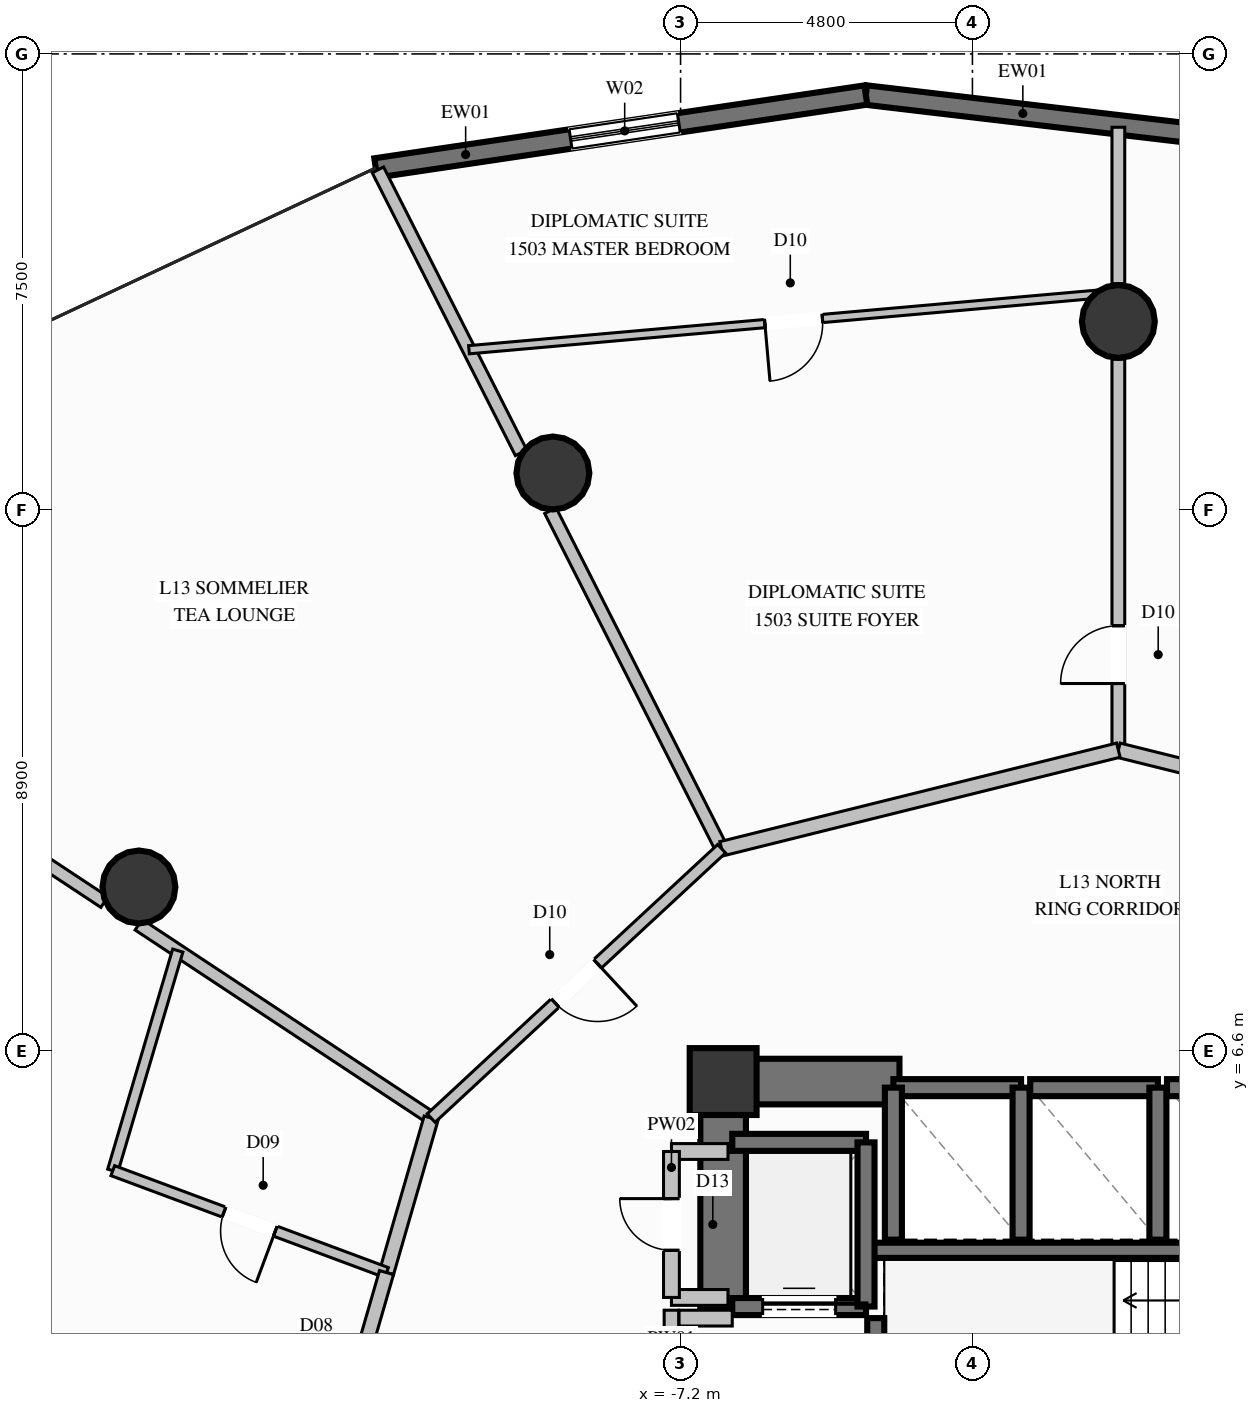
"""IFC4 building model, lengths in metres.
Left out: names, types, materials, properties, quantities, classifications, styles, units other than length and angle.
Written with IfcOpenShell. Run it as: python <this file> out.ifc"""

import sys

from ifc_helpers import new_model, si_unit, direction, frame, frame_2d, origin, origin_2d, place, context, subcontext, project, spatial, rectangle, circle, extrude, element, fill, save


model = new_model("IFC4")
c1 = context("Model", 3, precision=1e-05, world=origin(), true_north=direction((0.0, 1.0)))
c2 = subcontext(c1, "Body", "Model", "MODEL_VIEW")
j1 = project(units=[si_unit("LENGTHUNIT", "METRE"), si_unit("PLANEANGLEUNIT", "RADIAN")], contexts=[c1])
p1 = place(None, origin())
s1 = spatial("IfcSite", under=j1, at=p1, CompositionType="ELEMENT")
p2 = place(p1, origin())
s2 = spatial("IfcBuilding", under=s1, at=p2, CompositionType="ELEMENT")
p3 = place(p2, frame((0.0, 0.0, 57.2)))
s3 = spatial("IfcBuildingStorey", under=s2, at=p3, CompositionType="ELEMENT", Elevation=57.2)
p4 = place(p3, frame((-6.5, 6.1, 0.0), z_axis=(0.0, 0.0, 1.0), x_axis=(1.0, 0.0, 0.0)))
e1 = element("IfcColumn", 1, at=p4, inside=s3, PredefinedType="COLUMN", context=c2, shape_type="SweptSolid", body=[
    extrude(rectangle(XDim=1.1, YDim=1.1, at=origin_2d()), origin(), (0.0, 0.0, 1.0), 3.6),
])
p5 = place(p3, frame((-4.13, 3.325, 0.0), z_axis=(0.0, 0.0, 1.0), x_axis=(1.0, 0.0, 0.0)))
e2 = element("IfcWall", 2, at=p5, inside=s3, PredefinedType="SOLIDWALL", context=c2, shape_type="SweptSolid", body=[
    extrude(rectangle(XDim=8.26, YDim=0.25, at=frame_2d((4.13, 0.0))), origin(), (0.0, 0.0, 1.0), 3.6),
])
p6 = place(p3, frame((-6.125, 6.1, 0.0), z_axis=(0.0, 0.0, 1.0), x_axis=(1.0, 0.0, 0.0)))
e3 = element("IfcWall", 3, at=p6, inside=s3, PredefinedType="SHEAR", context=c2, shape_type="SweptSolid", body=[
    extrude(rectangle(XDim=2.525, YDim=0.75, at=frame_2d((1.262, 0.0))), origin(), (0.0, 0.0, 1.0), 3.6),
])
p7 = place(p3, frame((-6.5, 2.35, 0.0), z_axis=(0.0, 0.0, 1.0), x_axis=(0.0, 1.0, 0.0)))
e4 = element("IfcWall", 4, at=p7, inside=s3, PredefinedType="SHEAR", context=c2, shape_type="SweptSolid", body=[
    extrude(rectangle(XDim=4.125, YDim=0.75, at=frame_2d((2.062, 0.0))), origin(), (0.0, 0.0, 1.0), 3.6),
])
for number, where, z_axis, x_axis in (
    (5, (0.0, 18.6, 0.0), (0.0, 0.0, 1.0), (1.0, 0.0, 0.0)),
    (6, (-9.3, 16.108, 0.0), (0.0, 0.0, 1.0), (1.0, 0.0, 0.0)),
    (7, (-16.108, 9.3, 0.0), (0.0, 0.0, 1.0), (1.0, 0.0, 0.0)),
):
    element("IfcColumn", number, at=place(p3, frame(where, z_axis=z_axis, x_axis=x_axis)), inside=s3, PredefinedType="COLUMN", context=c2, shape_type="SweptSolid", body=[
        extrude(circle(Radius=0.6, at=origin_2d()), origin(), (0.0, 0.0, 1.0), 3.6),
    ])
p8 = place(p3, frame((-4.153, 22.324, 0.0), z_axis=(0.0, 0.0, 1.0), x_axis=(0.993124034761, -0.117066867986, 0.0)))
e8 = element("IfcWall", 8, at=p8, inside=s3, PredefinedType="SOLIDWALL", context=c2, shape_type="SweptSolid", body=[
    extrude(rectangle(XDim=8.413, YDim=0.32, at=frame_2d((4.207, 0.0))), origin(), (0.0, 0.0, 1.0), 3.34),
])
p9 = place(p8, frame((5.45, 0.0, 0.35)))
e9 = element("IfcOpeningElement", 9, at=p9, cuts=e8, PredefinedType="OPENING", context=c2, shape_type="SweptSolid", body=[
    extrude(rectangle(XDim=1.8, YDim=2.6, at=frame_2d((0.9, 1.3))), frame((0.0, 0.17, 0.0), z_axis=(0.0, -1.0, 0.0), x_axis=(1.0, 0.0, 0.0)), (0.0, 0.0, 1.0), 0.34),
])
p10 = place(p3, frame((-12.213, 21.125, 0.0), z_axis=(0.0, 0.0, 1.0), x_axis=(0.989115613059, 0.147140422734, 0.0)))
e10 = element("IfcWall", 10, at=p10, inside=s3, PredefinedType="SOLIDWALL", context=c2, shape_type="SweptSolid", body=[
    extrude(rectangle(XDim=8.148, YDim=0.32, at=frame_2d((4.074, 0.0))), origin(), (0.0, 0.0, 1.0), 3.34),
])
p11 = place(p10, frame((3.239, 0.0, 0.35)))
e11 = element("IfcOpeningElement", 11, at=p11, cuts=e10, PredefinedType="OPENING", context=c2, shape_type="SweptSolid", body=[
    extrude(rectangle(XDim=1.8, YDim=2.6, at=frame_2d((0.9, 1.3))), frame((0.0, 0.17, 0.0), z_axis=(0.0, -1.0, 0.0), x_axis=(1.0, 0.0, 0.0)), (0.0, 0.0, 1.0), 0.34),
])
p12 = place(p3, frame((-1.6, 6.0, 0.0), z_axis=(0.0, 0.0, 1.0), x_axis=(-1.0, 0.0, 0.0)))
e12 = element("IfcWall", 12, at=p12, inside=s3, PredefinedType="SOLIDWALL", context=c2, shape_type="SweptSolid", body=[
    extrude(rectangle(XDim=2.1, YDim=0.28, at=frame_2d((1.05, 0.0))), origin(), (0.0, 0.0, 1.0), 3.34),
])
for number, where, z_axis, x_axis in (
    (13, (-3.7, 6.0, 0.0), (0.0, 0.0, 1.0), (0.0, -1.0, 0.0)),
    (14, (-1.6, 3.5, 0.0), (0.0, 0.0, 1.0), (0.0, 1.0, 0.0)),
):
    element("IfcWall", number, at=place(p3, frame(where, z_axis=z_axis, x_axis=x_axis)), inside=s3, PredefinedType="SOLIDWALL", context=c2, shape_type="SweptSolid", body=[
        extrude(rectangle(XDim=2.5, YDim=0.28, at=frame_2d((1.25, 0.0))), origin(), (0.0, 0.0, 1.0), 3.34),
    ])
p13 = place(p3, frame((0.65, 6.0, 0.0), z_axis=(0.0, 0.0, 1.0), x_axis=(-1.0, 0.0, 0.0)))
e15 = element("IfcWall", 15, at=p13, inside=s3, PredefinedType="SOLIDWALL", context=c2, shape_type="SweptSolid", body=[
    extrude(rectangle(XDim=2.1, YDim=0.28, at=frame_2d((1.05, 0.0))), origin(), (0.0, 0.0, 1.0), 3.34),
])
p14 = place(p3, frame((0.65, 3.5, 0.0), z_axis=(0.0, 0.0, 1.0), x_axis=(0.0, 1.0, 0.0)))
e16 = element("IfcWall", 16, at=p14, inside=s3, PredefinedType="SOLIDWALL", context=c2, shape_type="SweptSolid", body=[
    extrude(rectangle(XDim=2.5, YDim=0.28, at=frame_2d((1.25, 0.0))), origin(), (0.0, 0.0, 1.0), 3.34),
])
p15 = place(p3, frame((3.0, 6.0, 0.0), z_axis=(0.0, 0.0, 1.0), x_axis=(-1.0, 0.0, 0.0)))
e17 = element("IfcWall", 17, at=p15, inside=s3, PredefinedType="SOLIDWALL", context=c2, shape_type="SweptSolid", body=[
    extrude(rectangle(XDim=2.2, YDim=0.28, at=frame_2d((1.1, 0.0))), origin(), (0.0, 0.0, 1.0), 3.34),
])
p16 = place(p3, frame((-6.35, 2.4, 0.0), z_axis=(0.0, 0.0, 1.0), x_axis=(1.0, 0.0, 0.0)))
e18 = element("IfcWall", 18, at=p16, inside=s3, PredefinedType="SOLIDWALL", context=c2, shape_type="SweptSolid", body=[
    extrude(rectangle(XDim=2.2, YDim=0.28, at=frame_2d((1.1, 0.0))), origin(), (0.0, 0.0, 1.0), 3.34),
])
p17 = place(p16, frame((0.5, 0.0, 0.0)))
e19 = element("IfcOpeningElement", 19, at=p17, cuts=e18, PredefinedType="OPENING", context=c2, shape_type="SweptSolid", body=[
    extrude(rectangle(XDim=1.2, YDim=2.2, at=frame_2d((0.6, 1.1))), frame((0.0, 0.15, 0.0), z_axis=(0.0, -1.0, 0.0), x_axis=(1.0, 0.0, 0.0)), (0.0, 0.0, 1.0), 0.3),
])
p18 = place(p3, frame((-4.15, 5.1, 0.0), z_axis=(0.0, 0.0, 1.0), x_axis=(-1.0, 0.0, 0.0)))
e20 = element("IfcWall", 20, at=p18, inside=s3, PredefinedType="SOLIDWALL", context=c2, shape_type="SweptSolid", body=[
    extrude(rectangle(XDim=2.2, YDim=0.28, at=frame_2d((1.1, 0.0))), origin(), (0.0, 0.0, 1.0), 3.34),
])
p19 = place(p3, frame((-4.15, 2.4, 0.0), z_axis=(0.0, 0.0, 1.0), x_axis=(0.0, 1.0, 0.0)))
e21 = element("IfcWall", 21, at=p19, inside=s3, PredefinedType="SOLIDWALL", context=c2, shape_type="SweptSolid", body=[
    extrude(rectangle(XDim=2.7, YDim=0.28, at=frame_2d((1.35, 0.0))), origin(), (0.0, 0.0, 1.0), 3.34),
])
p20 = place(p3, frame((-3.99, -3.25, 0.0), z_axis=(0.0, 0.0, 1.0), x_axis=(0.0, 1.0, 0.0)))
e22 = element("IfcWall", 22, at=p20, inside=s3, PredefinedType="SOLIDWALL", context=c2, shape_type="SweptSolid", body=[
    extrude(rectangle(XDim=5.46, YDim=0.28, at=frame_2d((2.73, 0.0))), origin(), (0.0, 0.0, 1.0), 3.34),
])
p21 = place(p20, frame((0.937, 0.0, 0.0)))
e23 = element("IfcOpeningElement", 23, at=p21, cuts=e22, PredefinedType="OPENING", context=c2, shape_type="SweptSolid", body=[
    extrude(rectangle(XDim=1.2, YDim=2.2, at=frame_2d((0.6, 1.1))), frame((0.0, 0.15, 0.0), z_axis=(0.0, -1.0, 0.0), x_axis=(1.0, 0.0, 0.0)), (0.0, 0.0, 1.0), 0.3),
])
p22 = place(p3, frame((-7.35, -2.78, 0.0), z_axis=(0.0, 0.0, 1.0), x_axis=(0.0, 1.0, 0.0)))
e24 = element("IfcWall", 24, at=p22, inside=s3, PredefinedType="PARTITIONING", context=c2, shape_type="SweptSolid", body=[
    extrude(rectangle(XDim=5.12, YDim=0.24, at=frame_2d((2.56, 0.0))), origin(), (0.0, 0.0, 1.0), 2.425),
])
p23 = place(p22, frame((1.389, 0.0, 0.0)))
e25 = element("IfcOpeningElement", 25, at=p23, cuts=e24, PredefinedType="OPENING", context=c2, shape_type="SweptSolid", body=[
    extrude(rectangle(XDim=1.15, YDim=2.2, at=frame_2d((0.575, 1.1))), frame((0.0, 0.13, 0.0), z_axis=(0.0, -1.0, 0.0), x_axis=(1.0, 0.0, 0.0)), (0.0, 0.0, 1.0), 0.26),
])
p24 = place(p3, frame((-7.225, 2.21, 0.0), z_axis=(0.0, 0.0, 1.0), x_axis=(1.0, 0.0, 0.0)))
e26 = element("IfcWall", 26, at=p24, inside=s3, PredefinedType="PARTITIONING", context=c2, shape_type="SweptSolid", body=[
    extrude(rectangle(XDim=0.875, YDim=0.26, at=frame_2d((0.438, 0.0))), origin(), (0.0, 0.0, 1.0), 3.34),
])
for number, where, z_axis, x_axis in (
    (27, (-7.35, 4.95, 0.0), (0.0, 0.0, 1.0), (1.0, 0.0, 0.0)),
    (28, (-7.35, 2.55, 0.0), (0.0, 0.0, 1.0), (1.0, 0.0, 0.0)),
):
    element("IfcWall", number, at=place(p3, frame(where, z_axis=z_axis, x_axis=x_axis)), inside=s3, PredefinedType="PARTITIONING", context=c2, shape_type="SweptSolid", body=[
        extrude(rectangle(XDim=0.93, YDim=0.26, at=frame_2d((0.465, 0.0))), origin(), (0.0, 0.0, 1.0), 3.34),
    ])
p25 = place(p3, frame((-7.35, 2.55, 0.0), z_axis=(0.0, 0.0, 1.0), x_axis=(0.0, 1.0, 0.0)))
e29 = element("IfcWall", 29, at=p25, inside=s3, PredefinedType="PARTITIONING", context=c2, shape_type="SweptSolid", body=[
    extrude(rectangle(XDim=2.4, YDim=0.26, at=frame_2d((1.2, 0.0))), origin(), (0.0, 0.0, 1.0), 2.425),
])
p26 = place(p25, frame((0.775, 0.0, 0.0)))
e30 = element("IfcOpeningElement", 30, at=p26, cuts=e29, PredefinedType="OPENING", context=c2, shape_type="SweptSolid", body=[
    extrude(rectangle(XDim=0.85, YDim=2.05, at=frame_2d((0.425, 1.025))), frame((0.0, 0.14, 0.0), z_axis=(0.0, -1.0, 0.0), x_axis=(1.0, 0.0, 0.0)), (0.0, 0.0, 1.0), 0.28),
])
p27 = place(p3, frame((0.0, 11.55, 0.0), z_axis=(0.0, 0.0, 1.0), x_axis=(0.0, 1.0, 0.0)))
e31 = element("IfcWall", 31, at=p27, inside=s3, PredefinedType="PARTITIONING", context=c2, shape_type="SweptSolid", body=[
    extrude(rectangle(XDim=6.43, YDim=0.21, at=frame_2d((3.215, 0.0))), origin(), (0.0, 0.0, 1.0), 2.707),
])
p28 = place(p27, frame((1.096, 0.0, 0.0)))
e32 = element("IfcOpeningElement", 32, at=p28, cuts=e31, PredefinedType="OPENING", context=c2, shape_type="SweptSolid", body=[
    extrude(rectangle(XDim=0.95, YDim=2.1, at=frame_2d((0.475, 1.05))), frame((0.0, 0.115, 0.0), z_axis=(0.0, -1.0, 0.0), x_axis=(1.0, 0.0, 0.0)), (0.0, 0.0, 1.0), 0.23),
])
p29 = place(p3, frame((0.0, 19.22, 0.0), z_axis=(0.0, 0.0, 1.0), x_axis=(0.0, 1.0, 0.0)))
e33 = element("IfcWall", 33, at=p29, inside=s3, PredefinedType="PARTITIONING", context=c2, shape_type="SweptSolid", body=[
    extrude(rectangle(XDim=2.574, YDim=0.21, at=frame_2d((1.287, 0.0))), origin(), (0.0, 0.0, 1.0), 3.34),
])
p30 = place(p3, frame((-6.525, 9.929, 0.0), z_axis=(0.0, 0.0, 1.0), x_axis=(-0.451845511916, 0.892096201853, 0.0)))
e34 = element("IfcWall", 34, at=p30, inside=s3, PredefinedType="PARTITIONING", context=c2, shape_type="SweptSolid", body=[
    extrude(rectangle(XDim=6.233, YDim=0.21, at=frame_2d((3.116, 0.0))), origin(), (0.0, 0.0, 1.0), 2.707),
])
p31 = place(p3, frame((-9.823, 16.441, 0.0), z_axis=(0.0, 0.0, 1.0), x_axis=(-0.451646831952, 0.892196805188, 0.0)))
e35 = element("IfcWall", 35, at=p31, inside=s3, PredefinedType="PARTITIONING", context=c2, shape_type="SweptSolid", body=[
    extrude(rectangle(XDim=5.214, YDim=0.21, at=frame_2d((2.607, 0.0))), origin(), (0.0, 0.0, 1.0), 3.34),
])
p32 = place(p3, frame((-11.302, 5.5, 0.0), z_axis=(0.0, 0.0, 1.0), x_axis=(-0.834238648556, 0.551403552088, 0.0)))
e36 = element("IfcWall", 36, at=p32, inside=s3, PredefinedType="PARTITIONING", context=c2, shape_type="SweptSolid", body=[
    extrude(rectangle(XDim=5.767, YDim=0.21, at=frame_2d((2.884, 0.0))), origin(), (0.0, 0.0, 1.0), 2.707),
])
p33 = place(p3, frame((-16.676, 9.052, 0.0), z_axis=(0.0, 0.0, 1.0), x_axis=(-0.834224712382, 0.551424636057, 0.0)))
e37 = element("IfcWall", 37, at=p33, inside=s3, PredefinedType="PARTITIONING", context=c2, shape_type="SweptSolid", body=[
    extrude(rectangle(XDim=8.25, YDim=0.21, at=frame_2d((4.125, 0.0))), origin(), (0.0, 0.0, 1.0), 3.34),
])
p34 = place(p3, frame((-11.302, 5.5, 0.0), z_axis=(0.0, 0.0, 1.0), x_axis=(-0.277475281216, -0.960732776746, 0.0)))
e38 = element("IfcWall", 38, at=p34, inside=s3, PredefinedType="PARTITIONING", context=c2, shape_type="SweptSolid", body=[
    extrude(rectangle(XDim=2.645, YDim=0.24, at=frame_2d((1.322, 0.0))), origin(), (0.0, 0.0, 1.0), 3.34),
])
p35 = place(p3, frame((-15.469, 8.254, 0.0), z_axis=(0.0, 0.0, 1.0), x_axis=(-0.283315036378, -0.959026897518, 0.0)))
e39 = element("IfcWall", 39, at=p35, inside=s3, PredefinedType="PLUMBINGWALL", context=c2, shape_type="SweptSolid", body=[
    extrude(rectangle(XDim=3.773, YDim=0.175, at=frame_2d((1.887, 0.0))), origin(), (0.0, 0.0, 1.0), 3.34),
])
p36 = place(p3, frame((-12.036, 2.959, 0.0), z_axis=(0.0, 0.0, 1.0), x_axis=(-0.937168147188, 0.348878007182, 0.0)))
e40 = element("IfcWall", 40, at=p36, inside=s3, PredefinedType="PLUMBINGWALL", context=c2, shape_type="SweptSolid", body=[
    extrude(rectangle(XDim=4.804, YDim=0.175, at=frame_2d((2.402, 0.0))), origin(), (0.0, 0.0, 1.0), 3.34),
])
p37 = place(p36, frame((1.952, 0.0, 0.0)))
e41 = element("IfcOpeningElement", 41, at=p37, cuts=e40, PredefinedType="OPENING", context=c2, shape_type="SweptSolid", body=[
    extrude(rectangle(XDim=0.9, YDim=2.1, at=frame_2d((0.45, 1.05))), frame((0.0, 0.098, 0.0), z_axis=(0.0, -1.0, 0.0), x_axis=(1.0, 0.0, 0.0)), (0.0, 0.0, 1.0), 0.195),
])
p38 = place(p3, frame((-12.036, 2.959, 0.0), z_axis=(0.0, 0.0, 1.0), x_axis=(-0.277650694477, -0.960682097187, 0.0)))
e42 = element("IfcWall", 42, at=p38, inside=s3, PredefinedType="PARTITIONING", context=c2, shape_type="SweptSolid", body=[
    extrude(rectangle(XDim=3.653, YDim=0.24, at=frame_2d((1.826, 0.0))), origin(), (0.0, 0.0, 1.0), 3.34),
])
p39 = place(p38, frame((1.276, 0.0, 0.0)))
e43 = element("IfcOpeningElement", 43, at=p39, cuts=e42, PredefinedType="OPENING", context=c2, shape_type="SweptSolid", body=[
    extrude(rectangle(XDim=1.1, YDim=2.3, at=frame_2d((0.55, 1.15))), frame((0.0, 0.13, 0.0), z_axis=(0.0, -1.0, 0.0), x_axis=(1.0, 0.0, 0.0)), (0.0, 0.0, 1.0), 0.26),
])
for number, where, z_axis, x_axis in (
    (44, (6.525, 9.929, 0.0), (0.0, 0.0, 1.0), (-0.97, 0.241, 0.0)),
    (45, (0.0, 11.55, 0.0), (0.0, 0.0, 1.0), (-0.97, -0.241, 0.0)),
):
    element("IfcWall", number, at=place(p3, frame(where, z_axis=z_axis, x_axis=x_axis)), inside=s3, PredefinedType="PARTITIONING", context=c2, shape_type="SweptSolid", body=[
        extrude(rectangle(XDim=6.723, YDim=0.24, at=frame_2d((3.362, 0.0))), origin(), (0.0, 0.0, 1.0), 2.919),
    ])
p40 = place(p3, frame((0.0, 19.079, 0.0), z_axis=(0.0, 0.0, 1.0), x_axis=(-0.996115587984, -0.088055297262, 0.0)))
e46 = element("IfcWall", 46, at=p40, inside=s3, PredefinedType="PARTITIONING", context=c2, shape_type="SweptSolid", body=[
    extrude(rectangle(XDim=10.722, YDim=0.135, at=frame_2d((5.361, 0.0))), origin(), (0.0, 0.0, 1.0), 2.792),
])
p41 = place(p40, frame((4.886, 0.0, 0.0)))
e47 = element("IfcOpeningElement", 47, at=p41, cuts=e46, PredefinedType="OPENING", context=c2, shape_type="SweptSolid", body=[
    extrude(rectangle(XDim=0.95, YDim=2.1, at=frame_2d((0.475, 1.05))), frame((0.0, 0.078, 0.0), z_axis=(0.0, -1.0, 0.0), x_axis=(1.0, 0.0, 0.0)), (0.0, 0.0, 1.0), 0.155),
])
p42 = place(p3, frame((-6.525, 9.929, 0.0), z_axis=(0.0, 0.0, 1.0), x_axis=(-0.733323191675, -0.679880207501, 0.0)))
e48 = element("IfcWall", 48, at=p42, inside=s3, PredefinedType="PARTITIONING", context=c2, shape_type="SweptSolid", body=[
    extrude(rectangle(XDim=6.514, YDim=0.19, at=frame_2d((3.257, 0.0))), origin(), (0.0, 0.0, 1.0), 3.34),
])
p43 = place(p42, frame((2.782, 0.0, 0.0)))
e49 = element("IfcOpeningElement", 49, at=p43, cuts=e48, PredefinedType="OPENING", context=c2, shape_type="SweptSolid", body=[
    extrude(rectangle(XDim=0.95, YDim=2.1, at=frame_2d((0.475, 1.05))), frame((0.0, 0.105, 0.0), z_axis=(0.0, -1.0, 0.0), x_axis=(1.0, 0.0, 0.0)), (0.0, 0.0, 1.0), 0.21),
])
p44 = place(p11, origin())
e50 = element("IfcWindow", 50, at=p44, inside=s3, PartitioningType="SINGLE_PANEL", PredefinedType="WINDOW", context=c2, shape_type="SweptSolid", body=[
    extrude(rectangle(XDim=1.8, YDim=2.6, at=frame_2d((0.9, 1.3))), frame((0.0, 0.03, 0.0), z_axis=(0.0, -1.0, 0.0), x_axis=(1.0, 0.0, 0.0)), (0.0, 0.0, 1.0), 0.06),
])
fill(e11, e50)
p45 = place(p17, origin())
e51 = element("IfcDoor", 51, at=p45, inside=s3, OperationType="SLIDING_TO_LEFT", PredefinedType="DOOR", context=c2, shape_type="SweptSolid", body=[
    extrude(rectangle(XDim=1.2, YDim=2.2, at=frame_2d((0.6, 1.1))), frame((0.0, 0.025, 0.0), z_axis=(0.0, -1.0, 0.0), x_axis=(1.0, 0.0, 0.0)), (0.0, 0.0, 1.0), 0.05),
])
fill(e19, e51)
p46 = place(p26, origin())
e52 = element("IfcDoor", 52, at=p46, inside=s3, OperationType="SINGLE_SWING_RIGHT", PredefinedType="DOOR", context=c2, shape_type="SweptSolid", body=[
    extrude(rectangle(XDim=0.85, YDim=2.05, at=frame_2d((0.425, 1.025))), frame((0.0, 0.025, 0.0), z_axis=(0.0, -1.0, 0.0), x_axis=(1.0, 0.0, 0.0)), (0.0, 0.0, 1.0), 0.05),
])
fill(e30, e52)
p47 = place(p37, origin())
e53 = element("IfcDoor", 53, at=p47, inside=s3, OperationType="SINGLE_SWING_LEFT", PredefinedType="DOOR", context=c2, shape_type="SweptSolid", body=[
    extrude(rectangle(XDim=0.9, YDim=2.1, at=frame_2d((0.45, 1.05))), frame((0.0, 0.025, 0.0), z_axis=(0.0, -1.0, 0.0), x_axis=(1.0, 0.0, 0.0)), (0.0, 0.0, 1.0), 0.05),
])
fill(e41, e53)
p48 = place(p28, origin())
e54 = element("IfcDoor", 54, at=p48, inside=s3, OperationType="SINGLE_SWING_LEFT", PredefinedType="DOOR", context=c2, shape_type="SweptSolid", body=[
    extrude(rectangle(XDim=0.95, YDim=2.1, at=frame_2d((0.475, 1.05))), frame((0.0, 0.025, 0.0), z_axis=(0.0, -1.0, 0.0), x_axis=(1.0, 0.0, 0.0)), (0.0, 0.0, 1.0), 0.05),
])
fill(e32, e54)
p49 = place(p41, origin())
e55 = element("IfcDoor", 55, at=p49, inside=s3, OperationType="SINGLE_SWING_RIGHT", PredefinedType="DOOR", context=c2, shape_type="SweptSolid", body=[
    extrude(rectangle(XDim=0.95, YDim=2.1, at=frame_2d((0.475, 1.05))), frame((0.0, 0.025, 0.0), z_axis=(0.0, -1.0, 0.0), x_axis=(1.0, 0.0, 0.0)), (0.0, 0.0, 1.0), 0.05),
])
fill(e47, e55)
p50 = place(p43, origin())
e56 = element("IfcDoor", 56, at=p50, inside=s3, OperationType="SINGLE_SWING_LEFT", PredefinedType="DOOR", context=c2, shape_type="SweptSolid", body=[
    extrude(rectangle(XDim=0.95, YDim=2.1, at=frame_2d((0.475, 1.05))), frame((0.0, 0.025, 0.0), z_axis=(0.0, -1.0, 0.0), x_axis=(1.0, 0.0, 0.0)), (0.0, 0.0, 1.0), 0.05),
])
fill(e49, e56)
save(model, sys.argv[1])
